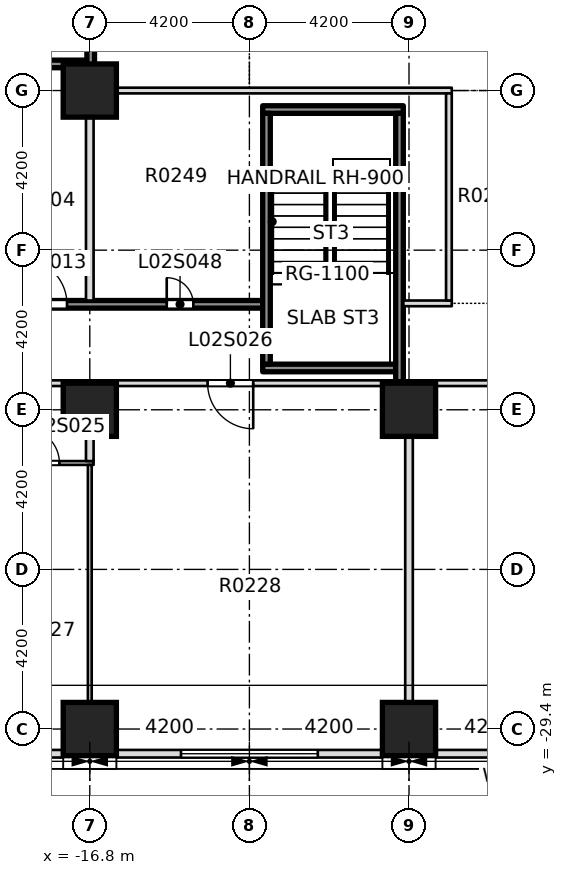
"""IFC4 building model, lengths in metres.
Left out: names, types, materials, properties, quantities, classifications, styles, units other than length and angle.
Written with IfcOpenShell. Run it as: python <this file> out.ifc"""

import sys

from ifc_helpers import new_model, si_unit, direction, frame, frame_2d, origin, origin_2d, place, context, subcontext, project, spatial, rectangle, extrude, element, fill, save


model = new_model("IFC4")
c1 = context("Model", 3, precision=1e-05, world=origin(), true_north=direction((0.0, 1.0)))
c2 = subcontext(c1, "Body", "Model", "MODEL_VIEW")
j1 = project(units=[si_unit("LENGTHUNIT", "METRE"), si_unit("PLANEANGLEUNIT", "RADIAN")], contexts=[c1])
p1 = place(None, origin())
s1 = spatial("IfcSite", under=j1, at=p1, CompositionType="ELEMENT")
p2 = place(p1, origin())
s2 = spatial("IfcBuilding", under=s1, at=p2, CompositionType="ELEMENT")
p3 = place(p2, frame((0.0, 0.0, 12.5)))
s3 = spatial("IfcBuildingStorey", under=s2, at=p3, CompositionType="ELEMENT", Elevation=12.5)
for number, where, z_axis, x_axis in (
    (1, (-16.8, -21.0, -0.4), (0.0, 0.0, 1.0), (1.0, 0.0, 0.0)),
    (2, (-8.4, -21.0, -0.4), (0.0, 0.0, 1.0), (1.0, 0.0, 0.0)),
    (3, (-16.8, -12.6, -0.4), (0.0, 0.0, 1.0), (1.0, 0.0, 0.0)),
    (4, (-16.8, -29.4, 0.0), (0.0, 0.0, 1.0), (1.0, 0.0, 0.0)),
    (5, (-8.4, -29.4, 0.0), (0.0, 0.0, 1.0), (1.0, 0.0, 0.0)),
):
    element("IfcColumn", number, at=place(p3, frame(where, z_axis=z_axis, x_axis=x_axis)), inside=s3, PredefinedType="COLUMN", context=c2, shape_type="SweptSolid", body=[
        extrude(rectangle(XDim=1.4, YDim=1.4, at=origin_2d()), origin(), (0.0, 0.0, 1.0), 7.5),
    ])
p4 = place(p3, frame((-25.2, -22.4, 0.0), z_axis=(0.0, 0.0, 1.0), x_axis=(1.0, 0.0, 0.0)))
e6 = element("IfcWall", 6, at=p4, inside=s3, PredefinedType="PARTITIONING", context=c2, shape_type="SweptSolid", body=[
    extrude(rectangle(XDim=8.5, YDim=0.1, at=frame_2d((4.25, 0.0))), origin(), (0.0, 0.0, 1.0), 7.1),
])
p5 = place(p4, frame((1.05, 0.0, 0.0)))
e7 = element("IfcOpeningElement", 7, at=p5, cuts=e6, PredefinedType="OPENING", context=c2, shape_type="SweptSolid", body=[
    extrude(rectangle(XDim=0.9, YDim=2.1, at=frame_2d((0.45, 1.05))), frame((0.0, 0.06, 0.0), z_axis=(0.0, -1.0, 0.0), x_axis=(1.0, 0.0, 0.0)), (0.0, 0.0, 1.0), 0.12),
])
p6 = place(p4, frame((4.05, 0.0, 0.0)))
e8 = element("IfcOpeningElement", 8, at=p6, cuts=e6, PredefinedType="OPENING", context=c2, shape_type="SweptSolid", body=[
    extrude(rectangle(XDim=0.9, YDim=2.1, at=frame_2d((0.45, 1.05))), frame((0.0, 0.06, 0.0), z_axis=(0.0, -1.0, 0.0), x_axis=(1.0, 0.0, 0.0)), (0.0, 0.0, 1.0), 0.12),
])
p7 = place(p4, frame((6.7, 0.0, 0.0)))
e9 = element("IfcOpeningElement", 9, at=p7, cuts=e6, PredefinedType="OPENING", context=c2, shape_type="SweptSolid", body=[
    extrude(rectangle(XDim=0.9, YDim=2.1, at=frame_2d((0.45, 1.05))), frame((0.0, 0.06, 0.0), z_axis=(0.0, -1.0, 0.0), x_axis=(1.0, 0.0, 0.0)), (0.0, 0.0, 1.0), 0.12),
])
p8 = place(p3, frame((-25.2, -20.3, 0.0), z_axis=(0.0, 0.0, 1.0), x_axis=(1.0, 0.0, 0.0)))
e10 = element("IfcWall", 10, at=p8, inside=s3, PredefinedType="PARTITIONING", context=c2, shape_type="SweptSolid", body=[
    extrude(rectangle(XDim=58.875, YDim=0.15, at=frame_2d((29.438, 0.0))), origin(), (0.0, 0.0, 1.0), 7.1),
])
p9 = place(p8, frame((3.65, 0.0, 0.0)))
e11 = element("IfcOpeningElement", 11, at=p9, cuts=e10, PredefinedType="OPENING", context=c2, shape_type="SweptSolid", body=[
    extrude(rectangle(XDim=1.1, YDim=2.1, at=frame_2d((0.55, 1.05))), frame((0.0, 0.085, 0.0), z_axis=(0.0, -1.0, 0.0), x_axis=(1.0, 0.0, 0.0)), (0.0, 0.0, 1.0), 0.17),
])
p10 = place(p8, frame((11.5, 0.0, 0.0)))
e12 = element("IfcOpeningElement", 12, at=p10, cuts=e10, PredefinedType="OPENING", context=c2, shape_type="SweptSolid", body=[
    extrude(rectangle(XDim=1.2, YDim=2.1, at=frame_2d((0.6, 1.05))), frame((0.0, 0.085, 0.0), z_axis=(0.0, -1.0, 0.0), x_axis=(1.0, 0.0, 0.0)), (0.0, 0.0, 1.0), 0.17),
])
p11 = place(p8, frame((20.55, 0.0, 0.0)))
e13 = element("IfcOpeningElement", 13, at=p11, cuts=e10, PredefinedType="OPENING", context=c2, shape_type="SweptSolid", body=[
    extrude(rectangle(XDim=0.9, YDim=2.1, at=frame_2d((0.45, 1.05))), frame((0.0, 0.085, 0.0), z_axis=(0.0, -1.0, 0.0), x_axis=(1.0, 0.0, 0.0)), (0.0, 0.0, 1.0), 0.17),
])
p12 = place(p8, frame((31.95, 0.0, 0.0)))
e14 = element("IfcOpeningElement", 14, at=p12, cuts=e10, PredefinedType="OPENING", context=c2, shape_type="SweptSolid", body=[
    extrude(rectangle(XDim=0.9, YDim=2.1, at=frame_2d((0.45, 1.05))), frame((0.0, 0.085, 0.0), z_axis=(0.0, -1.0, 0.0), x_axis=(1.0, 0.0, 0.0)), (0.0, 0.0, 1.0), 0.17),
])
p13 = place(p8, frame((45.65, 0.0, 0.0)))
e15 = element("IfcOpeningElement", 15, at=p13, cuts=e10, PredefinedType="OPENING", context=c2, shape_type="SweptSolid", body=[
    extrude(rectangle(XDim=1.1, YDim=2.1, at=frame_2d((0.55, 1.05))), frame((0.0, 0.085, 0.0), z_axis=(0.0, -1.0, 0.0), x_axis=(1.0, 0.0, 0.0)), (0.0, 0.0, 1.0), 0.17),
])
p14 = place(p8, frame((54.15, 0.0, 0.0)))
e16 = element("IfcOpeningElement", 16, at=p14, cuts=e10, PredefinedType="OPENING", context=c2, shape_type="SweptSolid", body=[
    extrude(rectangle(XDim=0.9, YDim=2.1, at=frame_2d((0.45, 1.05))), frame((0.0, 0.085, 0.0), z_axis=(0.0, -1.0, 0.0), x_axis=(1.0, 0.0, 0.0)), (0.0, 0.0, 1.0), 0.17),
])
p15 = place(p3, frame((-25.2, -18.225, 0.0), z_axis=(0.0, 0.0, 1.0), x_axis=(1.0, 0.0, 0.0)))
e17 = element("IfcWall", 17, at=p15, inside=s3, PredefinedType="SOLIDWALL", context=c2, shape_type="SweptSolid", body=[
    extrude(rectangle(XDim=12.95, YDim=0.2, at=frame_2d((6.475, 0.0))), origin(), (0.0, 0.0, 1.0), 7.1),
])
p16 = place(p15, frame((6.6, 0.0, 0.0)))
e18 = element("IfcOpeningElement", 18, at=p16, cuts=e17, PredefinedType="OPENING", context=c2, shape_type="SweptSolid", body=[
    extrude(rectangle(XDim=1.2, YDim=2.1, at=frame_2d((0.6, 1.05))), frame((0.0, 0.11, 0.0), z_axis=(0.0, -1.0, 0.0), x_axis=(1.0, 0.0, 0.0)), (0.0, 0.0, 1.0), 0.22),
])
p17 = place(p15, frame((10.425, 0.0, 0.0)))
e19 = element("IfcOpeningElement", 19, at=p17, cuts=e17, PredefinedType="OPENING", context=c2, shape_type="SweptSolid", body=[
    extrude(rectangle(XDim=0.7, YDim=2.1, at=frame_2d((0.35, 1.05))), frame((0.0, 0.11, 0.0), z_axis=(0.0, -1.0, 0.0), x_axis=(1.0, 0.0, 0.0)), (0.0, 0.0, 1.0), 0.22),
])
p18 = place(p3, frame((-8.55, -18.2, 0.0), z_axis=(0.0, 0.0, 1.0), x_axis=(1.0, 0.0, 0.0)))
e20 = element("IfcWall", 20, at=p18, inside=s3, PredefinedType="PARTITIONING", context=c2, shape_type="SweptSolid", body=[
    extrude(rectangle(XDim=1.275, YDim=0.15, at=frame_2d((0.638, 0.0))), origin(), (0.0, 0.0, 1.0), 7.1),
])
p19 = place(p3, frame((-16.9, -12.6, 0.0), z_axis=(0.0, 0.0, 1.0), x_axis=(1.0, 0.0, 0.0)))
e21 = element("IfcWall", 21, at=p19, inside=s3, PredefinedType="PARTITIONING", context=c2, shape_type="SweptSolid", body=[
    extrude(rectangle(XDim=9.625, YDim=0.15, at=frame_2d((4.812, 0.0))), origin(), (0.0, 0.0, 1.0), 7.1),
])
p20 = place(p3, frame((-25.2, -11.9, 0.0), z_axis=(0.0, 0.0, 1.0), x_axis=(1.0, 0.0, 0.0)))
e22 = element("IfcWall", 22, at=p20, inside=s3, PredefinedType="SOLIDWALL", context=c2, shape_type="SweptSolid", body=[
    extrude(rectangle(XDim=8.325, YDim=0.2, at=frame_2d((4.163, 0.0))), origin(), (0.0, 0.0, 1.0), 7.1),
])
p21 = place(p3, frame((-16.8, -29.95, 0.0), z_axis=(0.0, 0.0, 1.0), x_axis=(0.0, 1.0, 0.0)))
e23 = element("IfcWall", 23, at=p21, inside=s3, PredefinedType="PARTITIONING", context=c2, shape_type="SweptSolid", body=[
    extrude(rectangle(XDim=7.5, YDim=0.1, at=frame_2d((3.75, 0.0))), origin(), (0.0, 0.0, 1.0), 7.1),
])
p22 = place(p3, frame((-16.8, -22.35, 0.0), z_axis=(0.0, 0.0, 1.0), x_axis=(0.0, 1.0, 0.0)))
e24 = element("IfcWall", 24, at=p22, inside=s3, PredefinedType="PARTITIONING", context=c2, shape_type="SweptSolid", body=[
    extrude(rectangle(XDim=1.975, YDim=0.2, at=frame_2d((0.988, 0.0))), origin(), (0.0, 0.0, 1.0), 7.1),
])
p23 = place(p3, frame((-16.8, -18.125, 0.0), z_axis=(0.0, 0.0, 1.0), x_axis=(0.0, 1.0, 0.0)))
e25 = element("IfcWall", 25, at=p23, inside=s3, PredefinedType="PARTITIONING", context=c2, shape_type="SweptSolid", body=[
    extrude(rectangle(XDim=5.45, YDim=0.2, at=frame_2d((2.725, 0.0))), origin(), (0.0, 0.0, 1.0), 7.1),
])
p24 = place(p3, frame((-16.775, -12.525, 0.0), z_axis=(0.0, 0.0, 1.0), x_axis=(-0.000727609751, 0.999999735292, 0.0)))
e26 = element("IfcWall", 26, at=p24, inside=s3, PredefinedType="SOLIDWALL", context=c2, shape_type="SweptSolid", body=[
    extrude(rectangle(XDim=34.225, YDim=0.2, at=frame_2d((17.112, 0.0))), origin(), (0.0, 0.0, 1.0), 7.1),
])
p25 = place(p24, frame((16.225, 0.0, 0.0)))
e27 = element("IfcOpeningElement", 27, at=p25, cuts=e26, PredefinedType="OPENING", context=c2, shape_type="SweptSolid", body=[
    extrude(rectangle(XDim=0.9, YDim=2.1, at=frame_2d((0.45, 1.05))), frame((0.0, 0.11, 0.0), z_axis=(0.0, -1.0, 0.0), x_axis=(1.0, 0.0, 0.0)), (0.0, 0.0, 1.0), 0.22),
])
p26 = place(p3, frame((-8.4, -29.95, 0.0), z_axis=(0.0, 0.0, 1.0), x_axis=(0.0, 1.0, 0.0)))
e28 = element("IfcWall", 28, at=p26, inside=s3, PredefinedType="PARTITIONING", context=c2, shape_type="SweptSolid", body=[
    extrude(rectangle(XDim=9.575, YDim=0.2, at=frame_2d((4.788, 0.0))), origin(), (0.0, 0.0, 1.0), 7.1),
])
p27 = place(p3, frame((-7.35, -18.125, 0.0), z_axis=(0.0, 0.0, 1.0), x_axis=(0.0, 1.0, 0.0)))
e29 = element("IfcWall", 29, at=p27, inside=s3, PredefinedType="PARTITIONING", context=c2, shape_type="SweptSolid", body=[
    extrude(rectangle(XDim=5.45, YDim=0.15, at=frame_2d((2.725, 0.0))), origin(), (0.0, 0.0, 1.0), 7.1),
])
p28 = place(p3, frame((-24.5, -30.05, 0.0), z_axis=(0.0, 0.0, 1.0), x_axis=(1.0, 0.0, 0.0)))
e30 = element("IfcWall", 30, at=p28, inside=s3, PredefinedType="STANDARD", context=c2, shape_type="SweptSolid", body=[
    extrude(rectangle(XDim=7.0, YDim=0.2, at=frame_2d((3.5, 0.0))), origin(), (0.0, 0.0, 1.0), 7.1),
])
p29 = place(p28, frame((1.7, 0.0, 0.9)))
e31 = element("IfcOpeningElement", 31, at=p29, cuts=e30, PredefinedType="OPENING", context=c2, shape_type="SweptSolid", body=[
    extrude(rectangle(XDim=3.6, YDim=4.2, at=frame_2d((1.8, 2.1))), frame((0.0, 0.11, 0.0), z_axis=(0.0, -1.0, 0.0), x_axis=(1.0, 0.0, 0.0)), (0.0, 0.0, 1.0), 0.22),
])
p30 = place(p3, frame((-16.1, -30.05, 0.0), z_axis=(0.0, 0.0, 1.0), x_axis=(1.0, 0.0, 0.0)))
e32 = element("IfcWall", 32, at=p30, inside=s3, PredefinedType="STANDARD", context=c2, shape_type="SweptSolid", body=[
    extrude(rectangle(XDim=7.0, YDim=0.2, at=frame_2d((3.5, 0.0))), origin(), (0.0, 0.0, 1.0), 7.1),
])
p31 = place(p30, frame((1.7, 0.0, 0.9)))
e33 = element("IfcOpeningElement", 33, at=p31, cuts=e32, PredefinedType="OPENING", context=c2, shape_type="SweptSolid", body=[
    extrude(rectangle(XDim=3.6, YDim=4.2, at=frame_2d((1.8, 2.1))), frame((0.0, 0.11, 0.0), z_axis=(0.0, -1.0, 0.0), x_axis=(1.0, 0.0, 0.0)), (0.0, 0.0, 1.0), 0.22),
])
p32 = place(p3, frame((-7.7, -30.05, 0.0), z_axis=(0.0, 0.0, 1.0), x_axis=(1.0, 0.0, 0.0)))
e34 = element("IfcWall", 34, at=p32, inside=s3, PredefinedType="STANDARD", context=c2, shape_type="SweptSolid", body=[
    extrude(rectangle(XDim=7.0, YDim=0.2, at=frame_2d((3.5, 0.0))), origin(), (0.0, 0.0, 1.0), 7.1),
])
p33 = place(p32, frame((1.7, 0.0, 0.9)))
e35 = element("IfcOpeningElement", 35, at=p33, cuts=e34, PredefinedType="OPENING", context=c2, shape_type="SweptSolid", body=[
    extrude(rectangle(XDim=3.6, YDim=4.2, at=frame_2d((1.8, 2.1))), frame((0.0, 0.11, 0.0), z_axis=(0.0, -1.0, 0.0), x_axis=(1.0, 0.0, 0.0)), (0.0, 0.0, 1.0), 0.22),
])
for number, where, z_axis, x_axis in (
    (36, (-12.25, -19.9, 0.0), (0.0, 0.0, 1.0), (1.0, 0.0, 0.0)),
    (37, (-12.25, -13.1, 0.0), (0.0, 0.0, 1.0), (1.0, 0.0, 0.0)),
):
    element("IfcWall", number, at=place(p3, frame(where, z_axis=z_axis, x_axis=x_axis)), inside=s3, PredefinedType="SOLIDWALL", context=c2, shape_type="SweptSolid", body=[
        extrude(rectangle(XDim=3.7, YDim=0.2, at=frame_2d((1.85, 0.0))), origin(), (0.0, 0.0, 1.0), 7.1),
    ])
p34 = place(p3, frame((-12.15, -19.8, 0.0), z_axis=(0.0, 0.0, 1.0), x_axis=(0.0, 1.0, 0.0)))
e38 = element("IfcWall", 38, at=p34, inside=s3, PredefinedType="SOLIDWALL", context=c2, shape_type="SweptSolid", body=[
    extrude(rectangle(XDim=6.6, YDim=0.2, at=frame_2d((3.3, 0.0))), origin(), (0.0, 0.0, 1.0), 7.1),
])
p35 = place(p3, frame((-8.65, -20.3, 0.0), z_axis=(0.0, 0.0, 1.0), x_axis=(0.0, 1.0, 0.0)))
e39 = element("IfcWall", 39, at=p35, inside=s3, PredefinedType="SOLIDWALL", context=c2, shape_type="SweptSolid", body=[
    extrude(rectangle(XDim=7.1, YDim=0.2, at=frame_2d((3.55, 0.0))), origin(), (0.0, 0.0, 1.0), 7.1),
])
p36 = place(p16, origin())
e40 = element("IfcDoor", 40, at=p36, inside=s3, OperationType="SINGLE_SWING_RIGHT", PredefinedType="DOOR", context=c2, shape_type="SweptSolid", body=[
    extrude(rectangle(XDim=1.2, YDim=2.1, at=frame_2d((0.6, 1.05))), frame((0.0, 0.025, 0.0), z_axis=(0.0, -1.0, 0.0), x_axis=(1.0, 0.0, 0.0)), (0.0, 0.0, 1.0), 0.05),
])
fill(e18, e40)
p37 = place(p7, origin())
e41 = element("IfcDoor", 41, at=p37, inside=s3, OperationType="SINGLE_SWING_RIGHT", PredefinedType="DOOR", context=c2, shape_type="SweptSolid", body=[
    extrude(rectangle(XDim=0.9, YDim=2.1, at=frame_2d((0.45, 1.05))), frame((0.0, 0.025, 0.0), z_axis=(0.0, -1.0, 0.0), x_axis=(1.0, 0.0, 0.0)), (0.0, 0.0, 1.0), 0.05),
])
fill(e9, e41)
p38 = place(p10, origin())
e42 = element("IfcDoor", 42, at=p38, inside=s3, OperationType="SINGLE_SWING_RIGHT", PredefinedType="DOOR", context=c2, shape_type="SweptSolid", body=[
    extrude(rectangle(XDim=1.2, YDim=2.1, at=frame_2d((0.6, 1.05))), frame((0.0, 0.025, 0.0), z_axis=(0.0, -1.0, 0.0), x_axis=(1.0, 0.0, 0.0)), (0.0, 0.0, 1.0), 0.05),
])
fill(e12, e42)
p39 = place(p17, origin())
e43 = element("IfcDoor", 43, at=p39, inside=s3, OperationType="SINGLE_SWING_RIGHT", PredefinedType="DOOR", context=c2, shape_type="SweptSolid", body=[
    extrude(rectangle(XDim=0.7, YDim=2.1, at=frame_2d((0.35, 1.05))), frame((0.0, 0.025, 0.0), z_axis=(0.0, -1.0, 0.0), x_axis=(1.0, 0.0, 0.0)), (0.0, 0.0, 1.0), 0.05),
])
fill(e19, e43)
p40 = place(p31, origin())
e44 = element("IfcWindow", 44, at=p40, inside=s3, PartitioningType="SINGLE_PANEL", PredefinedType="WINDOW", context=c2, shape_type="SweptSolid", body=[
    extrude(rectangle(XDim=3.6, YDim=4.2, at=frame_2d((1.8, 2.1))), frame((0.0, 0.03, 0.0), z_axis=(0.0, -1.0, 0.0), x_axis=(1.0, 0.0, 0.0)), (0.0, 0.0, 1.0), 0.06),
])
fill(e33, e44)
save(model, sys.argv[1])
